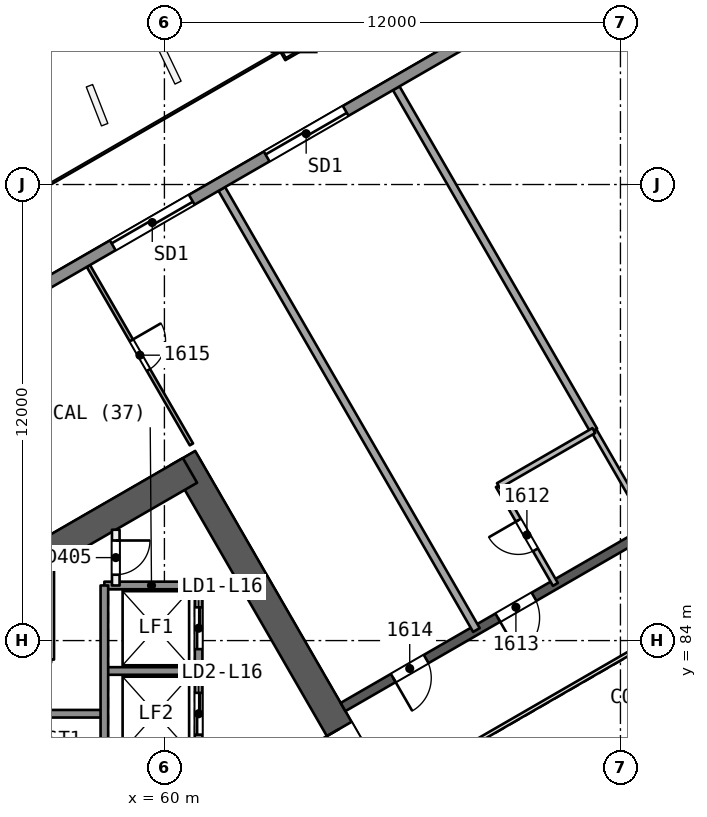
"""IFC4 building model, lengths in metres.
Left out: names, types, materials, properties, quantities, classifications, styles, units other than length and angle.
Written with IfcOpenShell. Run it as: python <this file> out.ifc"""

import sys

from ifc_helpers import new_model, si_unit, direction, frame, frame_2d, origin, origin_2d, place, context, subcontext, project, spatial, rectangle, extrude, element, fill, save


model = new_model("IFC4")
c1 = context("Model", 3, precision=1e-05, world=origin(), true_north=direction((0.0, 1.0)))
c2 = subcontext(c1, "Body", "Model", "MODEL_VIEW")
j1 = project(units=[si_unit("LENGTHUNIT", "METRE"), si_unit("PLANEANGLEUNIT", "RADIAN")], contexts=[c1])
p1 = place(None, origin())
s1 = spatial("IfcSite", under=j1, at=p1, CompositionType="ELEMENT")
p2 = place(p1, origin())
s2 = spatial("IfcBuilding", under=s1, at=p2, CompositionType="ELEMENT")
p3 = place(p2, frame((0.0, 0.0, 72.1)))
s3 = spatial("IfcBuildingStorey", under=s2, at=p3, CompositionType="ELEMENT", Elevation=72.1)
p4 = place(p3, frame((65.567, 80.0, 0.0), z_axis=(0.0, 0.0, 1.0), x_axis=(-0.499988615364, 0.866031976607, 0.0)))
e1 = element("IfcWall", 1, at=p4, inside=s3, PredefinedType="SHEAR", context=c2, shape_type="SweptSolid", body=[
    extrude(rectangle(XDim=10.163, YDim=0.75, at=frame_2d((5.082, 0.0))), origin(), (0.0, 0.0, 1.0), 3.7),
])
p5 = place(p4, frame((0.733, 0.0, 0.0)))
e2 = element("IfcOpeningElement", 2, at=p5, cuts=e1, PredefinedType="OPENING", context=c2, shape_type="SweptSolid", body=[
    extrude(rectangle(XDim=1.2, YDim=2.1, at=frame_2d((0.6, 1.05))), frame((0.0, 0.385, 0.0), z_axis=(0.0, -1.0, 0.0), x_axis=(1.0, 0.0, 0.0)), (0.0, 0.0, 1.0), 0.771),
])
p6 = place(p3, frame((60.673, 88.477, 0.0), z_axis=(0.0, 0.0, 1.0), x_axis=(-0.8660248072, -0.500001033313, 0.0)))
e3 = element("IfcWall", 3, at=p6, inside=s3, PredefinedType="SHEAR", context=c2, shape_type="SweptSolid", body=[
    extrude(rectangle(XDim=13.958, YDim=0.75, at=frame_2d((6.979, 0.0))), origin(), (0.0, 0.0, 1.0), 3.7),
])
p7 = place(p3, frame((78.2, 90.046, 0.0), z_axis=(0.0, 0.0, 1.0), x_axis=(-0.866026492143, -0.499998114903, 0.0)))
e4 = element("IfcWall", 4, at=p7, inside=s3, PredefinedType="SHEAR", context=c2, shape_type="SweptSolid", body=[
    extrude(rectangle(XDim=15.588, YDim=0.25, at=frame_2d((7.794, 0.0))), origin(), (0.0, 0.0, 1.0), 3.2),
])
p8 = place(p7, frame((4.718, 0.0, 0.0)))
e5 = element("IfcOpeningElement", 5, at=p8, cuts=e4, PredefinedType="OPENING", context=c2, shape_type="SweptSolid", body=[
    extrude(rectangle(XDim=1.0, YDim=2.1, at=frame_2d((0.5, 1.05))), frame((0.0, 0.135, 0.0), z_axis=(0.0, -1.0, 0.0), x_axis=(1.0, 0.0, 0.0)), (0.0, 0.0, 1.0), 0.271),
])
p9 = place(p7, frame((9.785, 0.0, 0.0)))
e6 = element("IfcOpeningElement", 6, at=p9, cuts=e4, PredefinedType="OPENING", context=c2, shape_type="SweptSolid", body=[
    extrude(rectangle(XDim=1.1, YDim=2.1, at=frame_2d((0.55, 1.05))), frame((0.0, 0.135, 0.0), z_axis=(0.0, -1.0, 0.0), x_axis=(1.0, 0.0, 0.0)), (0.0, 0.0, 1.0), 0.271),
])
p10 = place(p7, frame((13.062, 0.0, 0.0)))
e7 = element("IfcOpeningElement", 7, at=p10, cuts=e4, PredefinedType="OPENING", context=c2, shape_type="SweptSolid", body=[
    extrude(rectangle(XDim=1.0, YDim=2.1, at=frame_2d((0.5, 1.05))), frame((0.0, 0.135, 0.0), z_axis=(0.0, -1.0, 0.0), x_axis=(1.0, 0.0, 0.0)), (0.0, 0.0, 1.0), 0.271),
])
p11 = place(p3, frame((63.4, 100.092, 0.0), z_axis=(0.010093620709, -0.017482414954, 0.999796221231), x_axis=(-0.499902890187, 0.86584616669, 0.020187025825)))
e8 = element("IfcColumn", 8, at=p11, inside=s3, PredefinedType="COLUMN", context=c2, shape_type="SweptSolid", body=[
    extrude(rectangle(XDim=1.1, YDim=1.1, at=origin_2d()), origin(), (0.0, 0.0, 1.0), 3.701),
])
p12 = place(p3, frame((66.099, 98.534, 0.0), z_axis=(0.0, 0.0, 1.0), x_axis=(0.500011650862, -0.866018677052, 0.0)))
e9 = element("IfcWall", 9, at=p12, inside=s3, PredefinedType="PARTITIONING", context=c2, shape_type="SweptSolid", body=[
    extrude(rectangle(XDim=10.401, YDim=0.2, at=frame_2d((5.201, 0.0))), origin(), (0.0, 0.0, 1.0), 3.2),
])
p13 = place(p3, frame((71.3, 89.526, 0.0), z_axis=(0.0, 0.0, 1.0), x_axis=(0.499990139034, -0.866031096941, 0.0)))
e10 = element("IfcWall", 10, at=p13, inside=s3, PredefinedType="PARTITIONING", context=c2, shape_type="SweptSolid", body=[
    extrude(rectangle(XDim=3.0, YDim=0.15, at=frame_2d((1.5, 0.0))), origin(), (0.0, 0.0, 1.0), 3.2),
])
p14 = place(p3, frame((70.289, 85.478, 0.0), z_axis=(0.0, 0.0, 1.0), x_axis=(-0.50002537861, 0.866010750942, 0.0)))
e11 = element("IfcWall", 11, at=p14, inside=s3, PredefinedType="PARTITIONING", context=c2, shape_type="SweptSolid", body=[
    extrude(rectangle(XDim=3.0, YDim=0.15, at=frame_2d((1.5, 0.0))), origin(), (0.0, 0.0, 1.0), 3.2),
])
p15 = place(p14, frame((1.05, 0.0, 0.0)))
e12 = element("IfcOpeningElement", 12, at=p15, cuts=e11, PredefinedType="OPENING", context=c2, shape_type="SweptSolid", body=[
    extrude(rectangle(XDim=0.9, YDim=2.1, at=frame_2d((0.45, 1.05))), frame((0.0, 0.085, 0.0), z_axis=(0.0, -1.0, 0.0), x_axis=(1.0, 0.0, 0.0)), (0.0, 0.0, 1.0), 0.171),
])
p16 = place(p3, frame((68.789, 88.076, 0.0), z_axis=(0.0, 0.0, 1.0), x_axis=(0.865996321171, 0.50005036918, 0.0)))
e13 = element("IfcWall", 13, at=p16, inside=s3, PredefinedType="PARTITIONING", context=c2, shape_type="SweptSolid", body=[
    extrude(rectangle(XDim=2.9, YDim=0.15, at=frame_2d((1.45, 0.0))), origin(), (0.0, 0.0, 1.0), 3.2),
])
p17 = place(p3, frame((61.51, 95.884, 0.0), z_axis=(0.0, 0.0, 1.0), x_axis=(0.499993171696, -0.866029346071, 0.0)))
e14 = element("IfcWall", 14, at=p17, inside=s3, PredefinedType="PARTITIONING", context=c2, shape_type="SweptSolid", body=[
    extrude(rectangle(XDim=13.401, YDim=0.2, at=frame_2d((6.701, 0.0))), origin(), (0.0, 0.0, 1.0), 3.2),
])
p18 = place(p3, frame((58.0, 93.857, 0.0), z_axis=(0.0, 0.0, 1.0), x_axis=(0.499974500895, -0.866040125199, 0.0)))
e15 = element("IfcWall", 15, at=p18, inside=s3, PredefinedType="PARTITIONING", context=c2, shape_type="SweptSolid", body=[
    extrude(rectangle(XDim=5.422, YDim=0.1, at=frame_2d((2.711, 0.0))), origin(), (0.0, 0.0, 1.0), 3.2),
])
p19 = place(p18, frame((2.261, 0.0, 0.0)))
e16 = element("IfcOpeningElement", 16, at=p19, cuts=e15, PredefinedType="OPENING", context=c2, shape_type="SweptSolid", body=[
    extrude(rectangle(XDim=0.9, YDim=2.1, at=frame_2d((0.45, 1.05))), frame((0.0, 0.061, 0.0), z_axis=(0.0, -1.0, 0.0), x_axis=(1.0, 0.0, 0.0)), (0.0, 0.0, 1.0), 0.121),
])
p20 = place(p3, frame((38.962, 83.038, 0.0), z_axis=(0.0, 0.0, 1.0), x_axis=(0.866024483997, 0.500001593116, 0.0)))
e17 = element("IfcWall", 17, at=p20, inside=s3, PredefinedType="SOLIDWALL", context=c2, shape_type="SweptSolid", body=[
    extrude(rectangle(XDim=59.381, YDim=0.3, at=frame_2d((29.69, 0.0))), origin(), (0.0, 0.0, 1.0), 3.2),
])
p21 = place(p20, frame((27.399, 0.0, 0.0)))
e18 = element("IfcOpeningElement", 18, at=p21, cuts=e17, PredefinedType="OPENING", context=c2, shape_type="SweptSolid", body=[
    extrude(rectangle(XDim=2.4, YDim=2.4, at=frame_2d((1.2, 1.2))), frame((0.0, 0.161, 0.0), z_axis=(0.0, -1.0, 0.0), x_axis=(1.0, 0.0, 0.0)), (0.0, 0.0, 1.0), 0.321),
])
p22 = place(p20, frame((22.723, 0.0, 0.0)))
e19 = element("IfcOpeningElement", 19, at=p22, cuts=e17, PredefinedType="OPENING", context=c2, shape_type="SweptSolid", body=[
    extrude(rectangle(XDim=2.4, YDim=2.4, at=frame_2d((1.2, 1.2))), frame((0.0, 0.161, 0.0), z_axis=(0.0, -1.0, 0.0), x_axis=(1.0, 0.0, 0.0)), (0.0, 0.0, 1.0), 0.321),
])
p23 = place(p20, frame((10.887, 0.0, 0.0)))
e20 = element("IfcOpeningElement", 20, at=p23, cuts=e17, PredefinedType="OPENING", context=c2, shape_type="SweptSolid", body=[
    extrude(rectangle(XDim=2.4, YDim=2.4, at=frame_2d((1.2, 1.2))), frame((0.0, 0.161, 0.0), z_axis=(0.0, -1.0, 0.0), x_axis=(1.0, 0.0, 0.0)), (0.0, 0.0, 1.0), 0.321),
])
p24 = place(p20, frame((44.158, 0.0, 0.0)))
e21 = element("IfcOpeningElement", 21, at=p24, cuts=e17, PredefinedType="OPENING", context=c2, shape_type="SweptSolid", body=[
    extrude(rectangle(XDim=2.4, YDim=2.4, at=frame_2d((1.2, 1.2))), frame((0.0, 0.161, 0.0), z_axis=(0.0, -1.0, 0.0), x_axis=(1.0, 0.0, 0.0)), (0.0, 0.0, 1.0), 0.321),
])
for number, where, z_axis, x_axis in (
    (22, (60.9, 85.45, 0.0), (0.0, 0.0, 1.0), (-1.0, 0.0, 0.0)),
    (23, (60.9, 83.2, 0.0), (0.0, 0.0, 1.0), (-1.0, 0.0, 0.0)),
):
    element("IfcWall", number, at=place(p3, frame(where, z_axis=z_axis, x_axis=x_axis)), inside=s3, PredefinedType="SOLIDWALL", context=c2, shape_type="SweptSolid", body=[
        extrude(rectangle(XDim=2.48, YDim=0.2, at=frame_2d((1.24, 0.0))), origin(), (0.0, 0.0, 1.0), 3.2),
    ])
p25 = place(p3, frame((58.42, 82.075, 0.0), z_axis=(0.0, 0.0, 1.0), x_axis=(-1.0, 0.0, 0.0)))
e24 = element("IfcWall", 24, at=p25, inside=s3, PredefinedType="SOLIDWALL", context=c2, shape_type="SweptSolid", body=[
    extrude(rectangle(XDim=7.7, YDim=0.2, at=frame_2d((3.85, 0.0))), origin(), (0.0, 0.0, 1.0), 3.2),
])
p26 = place(p3, frame((60.9, 85.45, 0.0), z_axis=(0.0, 0.0, 1.0), x_axis=(0.0, -1.0, 0.0)))
e25 = element("IfcWall", 25, at=p26, inside=s3, PredefinedType="SOLIDWALL", context=c2, shape_type="SweptSolid", body=[
    extrude(rectangle(XDim=10.9, YDim=0.2, at=frame_2d((5.45, 0.0))), origin(), (0.0, 0.0, 1.0), 3.2),
])
p27 = place(p26, frame((0.575, 0.0, 0.0)))
e26 = element("IfcOpeningElement", 26, at=p27, cuts=e25, PredefinedType="OPENING", context=c2, shape_type="SweptSolid", body=[
    extrude(rectangle(XDim=1.1, YDim=2.1, at=frame_2d((0.55, 1.05))), frame((0.0, 0.11, 0.0), z_axis=(0.0, -1.0, 0.0), x_axis=(1.0, 0.0, 0.0)), (0.0, 0.0, 1.0), 0.221),
])
p28 = place(p26, frame((2.825, 0.0, 0.0)))
e27 = element("IfcOpeningElement", 27, at=p28, cuts=e25, PredefinedType="OPENING", context=c2, shape_type="SweptSolid", body=[
    extrude(rectangle(XDim=1.1, YDim=2.1, at=frame_2d((0.55, 1.05))), frame((0.0, 0.11, 0.0), z_axis=(0.0, -1.0, 0.0), x_axis=(1.0, 0.0, 0.0)), (0.0, 0.0, 1.0), 0.221),
])
p29 = place(p26, frame((5.075, 0.0, 0.0)))
e28 = element("IfcOpeningElement", 28, at=p29, cuts=e25, PredefinedType="OPENING", context=c2, shape_type="SweptSolid", body=[
    extrude(rectangle(XDim=1.1, YDim=2.1, at=frame_2d((0.55, 1.05))), frame((0.0, 0.11, 0.0), z_axis=(0.0, -1.0, 0.0), x_axis=(1.0, 0.0, 0.0)), (0.0, 0.0, 1.0), 0.221),
])
p30 = place(p26, frame((7.325, 0.0, 0.0)))
e29 = element("IfcOpeningElement", 29, at=p30, cuts=e25, PredefinedType="OPENING", context=c2, shape_type="SweptSolid", body=[
    extrude(rectangle(XDim=1.1, YDim=2.1, at=frame_2d((0.55, 1.05))), frame((0.0, 0.11, 0.0), z_axis=(0.0, -1.0, 0.0), x_axis=(1.0, 0.0, 0.0)), (0.0, 0.0, 1.0), 0.221),
])
p31 = place(p3, frame((58.72, 86.917, 0.0), z_axis=(0.0, 0.0, 1.0), x_axis=(0.0, -1.0, 0.0)))
e30 = element("IfcWall", 30, at=p31, inside=s3, PredefinedType="PARTITIONING", context=c2, shape_type="SweptSolid", body=[
    extrude(rectangle(XDim=1.467, YDim=0.2, at=frame_2d((0.733, 0.0))), origin(), (0.0, 0.0, 1.0), 3.2),
])
p32 = place(p31, frame((0.283, 0.0, 0.0)))
e31 = element("IfcOpeningElement", 31, at=p32, cuts=e30, PredefinedType="OPENING", context=c2, shape_type="SweptSolid", body=[
    extrude(rectangle(XDim=0.9, YDim=2.1, at=frame_2d((0.45, 1.05))), frame((0.0, 0.11, 0.0), z_axis=(0.0, -1.0, 0.0), x_axis=(1.0, 0.0, 0.0)), (0.0, 0.0, 1.0), 0.221),
])
p33 = place(p3, frame((58.42, 85.45, 0.0), z_axis=(0.0, 0.0, 1.0), x_axis=(0.0, -1.0, 0.0)))
e32 = element("IfcWall", 32, at=p33, inside=s3, PredefinedType="SOLIDWALL", context=c2, shape_type="SweptSolid", body=[
    extrude(rectangle(XDim=9.0, YDim=0.2, at=frame_2d((4.5, 0.0))), origin(), (0.0, 0.0, 1.0), 3.2),
])
p34 = place(p3, frame((57.02, 85.935, 0.0), z_axis=(0.0, 0.0, 1.0), x_axis=(0.0, -1.0, 0.0)))
e33 = element("IfcWall", 33, at=p34, inside=s3, PredefinedType="PARTITIONING", context=c2, shape_type="SweptSolid", body=[
    extrude(rectangle(XDim=2.435, YDim=0.15, at=frame_2d((1.218, 0.0))), origin(), (0.0, 0.0, 1.0), 3.2),
])
p35 = place(p3, frame((77.738, 86.846, 0.0), z_axis=(0.0, 0.0, 1.0), x_axis=(-0.866026658274, -0.499997827154, 0.0)))
e34 = element("IfcWall", 34, at=p35, inside=s3, PredefinedType="PARTITIONING", context=c2, shape_type="SweptSolid", body=[
    extrude(rectangle(XDim=11.588, YDim=0.1, at=frame_2d((5.794, 0.0))), origin(), (0.0, 0.0, 1.0), 3.2),
])
p36 = place(p15, origin())
e35 = element("IfcDoor", 35, at=p36, inside=s3, OperationType="SINGLE_SWING_RIGHT", PredefinedType="NOTDEFINED", context=c2, shape_type="SweptSolid", body=[
    extrude(rectangle(XDim=0.9, YDim=2.1, at=frame_2d((0.45, 1.05))), frame((0.0, 0.025, 0.0), z_axis=(0.0, -1.0, 0.0), x_axis=(1.0, 0.0, 0.0)), (0.0, 0.0, 1.0), 0.05),
])
fill(e12, e35)
p37 = place(p9, origin())
e36 = element("IfcDoor", 36, at=p37, inside=s3, OperationType="SINGLE_SWING_RIGHT", PredefinedType="NOTDEFINED", context=c2, shape_type="SweptSolid", body=[
    extrude(rectangle(XDim=1.1, YDim=2.1, at=frame_2d((0.55, 1.05))), frame((0.0, 0.025, 0.0), z_axis=(0.0, -1.0, 0.0), x_axis=(1.0, 0.0, 0.0)), (0.0, 0.0, 1.0), 0.05),
])
fill(e6, e36)
p38 = place(p10, origin())
e37 = element("IfcDoor", 37, at=p38, inside=s3, OperationType="SINGLE_SWING_RIGHT", PredefinedType="NOTDEFINED", context=c2, shape_type="SweptSolid", body=[
    extrude(rectangle(XDim=1.0, YDim=2.1, at=frame_2d((0.5, 1.05))), frame((0.0, 0.025, 0.0), z_axis=(0.0, -1.0, 0.0), x_axis=(1.0, 0.0, 0.0)), (0.0, 0.0, 1.0), 0.05),
])
fill(e7, e37)
p39 = place(p19, origin())
e38 = element("IfcDoor", 38, at=p39, inside=s3, OperationType="SINGLE_SWING_LEFT", PredefinedType="NOTDEFINED", context=c2, shape_type="SweptSolid", body=[
    extrude(rectangle(XDim=0.9, YDim=2.1, at=frame_2d((0.45, 1.05))), frame((0.0, 0.025, 0.0), z_axis=(0.0, -1.0, 0.0), x_axis=(1.0, 0.0, 0.0)), (0.0, 0.0, 1.0), 0.05),
])
fill(e16, e38)
p40 = place(p21, origin())
e39 = element("IfcDoor", 39, at=p40, inside=s3, OperationType="SLIDING_TO_LEFT", PredefinedType="NOTDEFINED", context=c2, shape_type="SweptSolid", body=[
    extrude(rectangle(XDim=2.4, YDim=2.4, at=frame_2d((1.2, 1.2))), frame((0.0, 0.025, 0.0), z_axis=(0.0, -1.0, 0.0), x_axis=(1.0, 0.0, 0.0)), (0.0, 0.0, 1.0), 0.05),
])
fill(e18, e39)
p41 = place(p22, origin())
e40 = element("IfcDoor", 40, at=p41, inside=s3, OperationType="SLIDING_TO_RIGHT", PredefinedType="NOTDEFINED", context=c2, shape_type="SweptSolid", body=[
    extrude(rectangle(XDim=2.4, YDim=2.4, at=frame_2d((1.2, 1.2))), frame((0.0, 0.025, 0.0), z_axis=(0.0, -1.0, 0.0), x_axis=(1.0, 0.0, 0.0)), (0.0, 0.0, 1.0), 0.05),
])
fill(e19, e40)
p42 = place(p5, origin())
e41 = element("IfcDoor", 41, at=p42, inside=s3, OperationType="SINGLE_SWING_RIGHT", PredefinedType="NOTDEFINED", context=c2, shape_type="SweptSolid", body=[
    extrude(rectangle(XDim=1.2, YDim=2.1, at=frame_2d((0.6, 1.05))), frame((0.0, 0.025, 0.0), z_axis=(0.0, -1.0, 0.0), x_axis=(1.0, 0.0, 0.0)), (0.0, 0.0, 1.0), 0.05),
])
fill(e2, e41)
p43 = place(p27, origin())
e42 = element("IfcDoor", 42, at=p43, inside=s3, OperationType="SLIDING_TO_RIGHT", PredefinedType="NOTDEFINED", context=c2, shape_type="SweptSolid", body=[
    extrude(rectangle(XDim=1.1, YDim=2.1, at=frame_2d((0.55, 1.05))), frame((0.0, 0.025, 0.0), z_axis=(0.0, -1.0, 0.0), x_axis=(1.0, 0.0, 0.0)), (0.0, 0.0, 1.0), 0.05),
])
fill(e26, e42)
p44 = place(p28, origin())
e43 = element("IfcDoor", 43, at=p44, inside=s3, OperationType="SLIDING_TO_LEFT", PredefinedType="NOTDEFINED", context=c2, shape_type="SweptSolid", body=[
    extrude(rectangle(XDim=1.1, YDim=2.1, at=frame_2d((0.55, 1.05))), frame((0.0, 0.025, 0.0), z_axis=(0.0, -1.0, 0.0), x_axis=(1.0, 0.0, 0.0)), (0.0, 0.0, 1.0), 0.05),
])
fill(e27, e43)
p45 = place(p32, origin())
e44 = element("IfcDoor", 44, at=p45, inside=s3, OperationType="SINGLE_SWING_LEFT", PredefinedType="NOTDEFINED", context=c2, shape_type="SweptSolid", body=[
    extrude(rectangle(XDim=0.9, YDim=2.1, at=frame_2d((0.45, 1.05))), frame((0.0, 0.025, 0.0), z_axis=(0.0, -1.0, 0.0), x_axis=(1.0, 0.0, 0.0)), (0.0, 0.0, 1.0), 0.05),
])
fill(e31, e44)
save(model, sys.argv[1])
